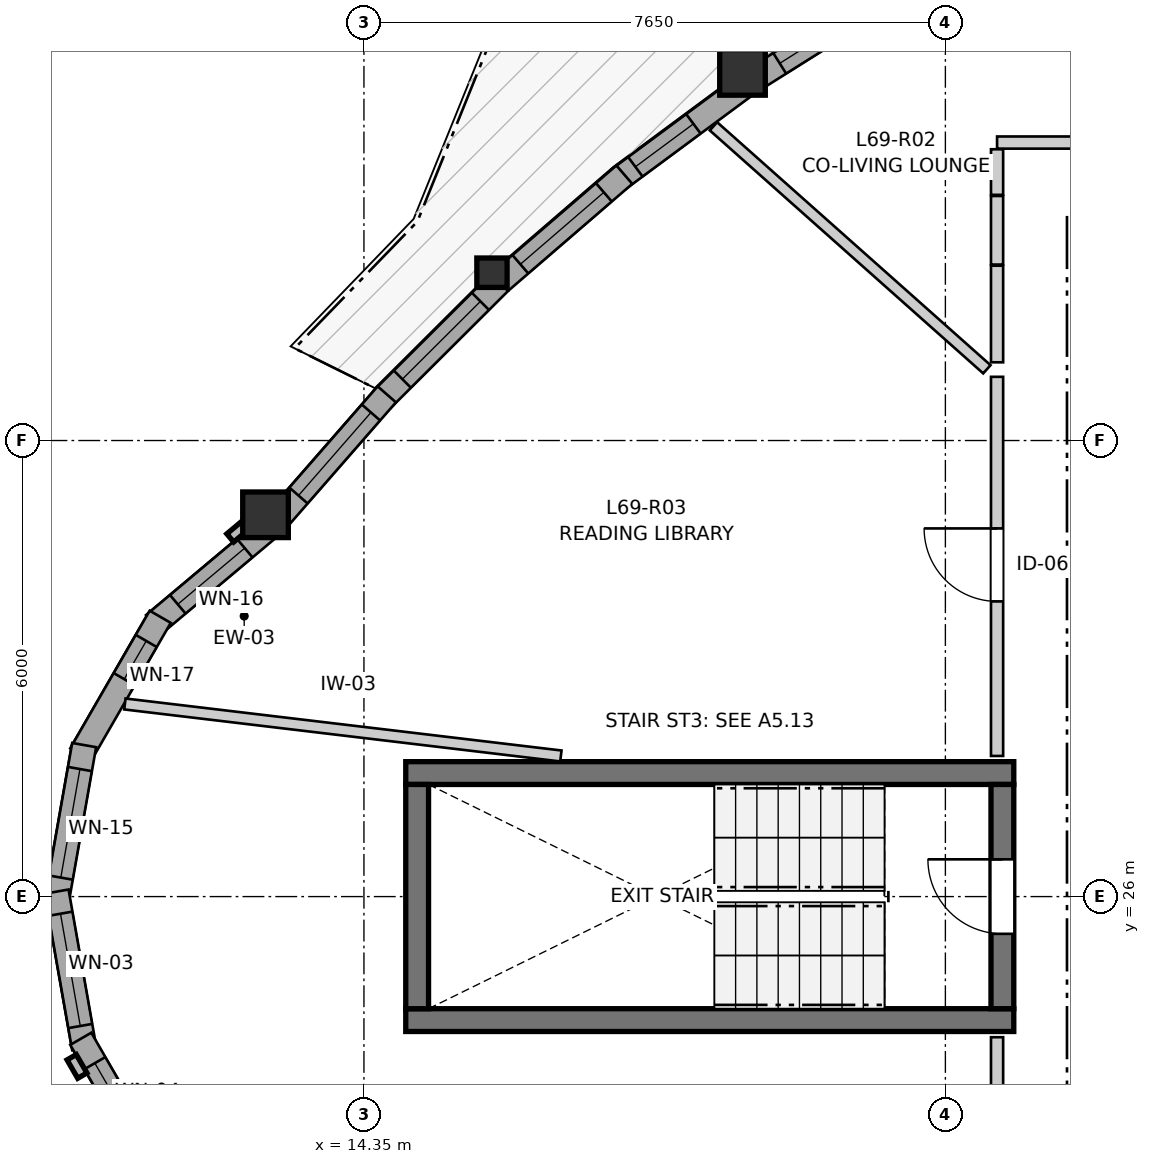
"""IFC4 building model, lengths in metres.
Left out: names, types, materials, properties, quantities, classifications, styles, units other than length and angle.
Written with IfcOpenShell. Run it as: python <this file> out.ifc"""

import sys

from ifc_helpers import new_model, si_unit, direction, frame, frame_2d, origin, origin_2d, place, context, subcontext, project, spatial, rectangle, i_section, extrude, source, transform, mapped, element, fill, save


model = new_model("IFC4")
c1 = context("Model", 3, precision=1e-05, world=origin(), true_north=direction((0.0, 1.0)))
c2 = subcontext(c1, "Body", "Model", "MODEL_VIEW")
j1 = project(units=[si_unit("LENGTHUNIT", "METRE"), si_unit("PLANEANGLEUNIT", "RADIAN")], contexts=[c1])
p1 = place(None, origin())
s1 = spatial("IfcSite", under=j1, at=p1, CompositionType="ELEMENT")
p2 = place(p1, origin())
s2 = spatial("IfcBuilding", under=s1, at=p2, CompositionType="ELEMENT")
p3 = place(p2, frame((0.0, 0.0, 230.8)))
s3 = spatial("IfcBuildingStorey", under=s2, at=p3, CompositionType="ELEMENT", Elevation=230.8)
for number, where, z_axis, x_axis in (
    (1, (14.9, 24.375, 0.0), (0.0, 0.0, 1.0), (1.0, 0.0, 0.0)),
    (2, (22.9, 27.625, 0.0), (0.0, 0.0, 1.0), (-1.0, 0.0, 0.0)),
):
    element("IfcWall", number, at=place(p3, frame(where, z_axis=z_axis, x_axis=x_axis)), inside=s3, PredefinedType="SHEAR", context=c2, shape_type="SweptSolid", body=[
        extrude(rectangle(XDim=8.0, YDim=0.3, at=frame_2d((4.0, 0.0))), origin(), (0.0, 0.0, 1.0), 2.96),
    ])
p4 = place(p3, frame((15.05, 27.475, 0.0), z_axis=(0.0, 0.0, 1.0), x_axis=(0.0, -1.0, 0.0)))
e3 = element("IfcWall", 3, at=p4, inside=s3, PredefinedType="SHEAR", context=c2, shape_type="SweptSolid", body=[
    extrude(rectangle(XDim=2.95, YDim=0.3, at=frame_2d((1.475, 0.0))), origin(), (0.0, 0.0, 1.0), 2.96),
])
p5 = place(p3, frame((22.75, 24.525, 0.0), z_axis=(0.0, 0.0, 1.0), x_axis=(0.0, 1.0, 0.0)))
e4 = element("IfcWall", 4, at=p5, inside=s3, PredefinedType="SHEAR", context=c2, shape_type="SweptSolid", body=[
    extrude(rectangle(XDim=2.95, YDim=0.3, at=frame_2d((1.475, 0.0))), origin(), (0.0, 0.0, 1.0), 2.96),
])
p6 = place(p5, frame((0.985, 0.0, 0.0)))
e5 = element("IfcOpeningElement", 5, at=p6, cuts=e4, PredefinedType="OPENING", context=c2, shape_type="SweptSolid", body=[
    extrude(rectangle(XDim=0.98, YDim=2.15, at=frame_2d((0.49, 1.075))), frame((0.0, 0.16, 0.0), z_axis=(0.0, -1.0, 0.0), x_axis=(1.0, 0.0, 0.0)), (0.0, 0.0, 1.0), 0.32),
])
m1 = source(origin(), c2, "Body", "SweptSolid", [
    extrude(rectangle(XDim=0.6, YDim=0.6, at=origin_2d()), origin(), (0.0, 0.0, 1.0), 2.96),
])
for number, where, z_axis, x_axis in (
    (6, (13.055, 31.023, 0.0), (0.0, 0.0, 1.0), (1.0, 0.0, 0.0)),
    (7, (19.331, 36.843, 0.0), (0.0, 0.0, 1.0), (1.0, 0.0, 0.0)),
):
    element("IfcColumn", number, at=place(p3, frame(where, z_axis=z_axis, x_axis=x_axis)), inside=s3, PredefinedType="COLUMN", context=c2, shape_type="MappedRepresentation", body=[
        mapped(m1, transform((0.0, 0.0, 0.0), x_axis=(1.0, 0.0, 0.0), y_axis=(0.0, 1.0, 0.0), z_axis=(0.0, 0.0, 1.0), scale=1.0)),
    ])
m2 = source(origin(), c2, "Body", "SweptSolid", [
    extrude(i_section(OverallWidth=0.398, OverallDepth=0.387, WebThickness=0.019, FlangeThickness=0.03, FilletRadius=0.015, at=origin_2d()), origin(), (0.0, 0.0, 1.0), 2.96),
])
p7 = place(p3, frame((16.034, 34.208, 0.0), z_axis=(0.0, 0.0, 1.0), x_axis=(1.0, 0.0, 0.0)))
e8 = element("IfcColumn", 8, at=p7, inside=s3, PredefinedType="PILASTER", context=c2, shape_type="MappedRepresentation", body=[
    mapped(m2, transform((0.0, 0.0, 0.0), x_axis=(1.0, 0.0, 0.0), y_axis=(0.0, 1.0, 0.0), z_axis=(0.0, 0.0, 1.0), scale=1.0)),
])
p8 = place(p3, frame((13.089, 30.843, 0.0), z_axis=(0.0, 0.0, 1.0), x_axis=(-0.76606505432, -0.642763045414, 0.0)))
e9 = element("IfcWall", 9, at=p8, inside=s3, PredefinedType="SOLIDWALL", context=c2, shape_type="SweptSolid", body=[
    extrude(rectangle(XDim=1.962, YDim=0.32, at=frame_2d((0.981, 0.0))), origin(), (0.0, 0.0, 1.0), 2.58),
])
p9 = place(p8, frame((0.401, 0.0, 0.82)))
e10 = element("IfcOpeningElement", 10, at=p9, cuts=e9, PredefinedType="OPENING", context=c2, shape_type="SweptSolid", body=[
    extrude(rectangle(XDim=1.15, YDim=1.2, at=frame_2d((0.575, 0.6))), frame((0.0, 0.17, 0.0), z_axis=(0.0, -1.0, 0.0), x_axis=(1.0, 0.0, 0.0)), (0.0, 0.0, 1.0), 0.34),
])
p10 = place(p3, frame((11.669, 29.681, 0.0), z_axis=(0.0, 0.0, 1.0), x_axis=(-0.49990781971, -0.866078617559, 0.0)))
e11 = element("IfcWall", 11, at=p10, inside=s3, PredefinedType="SOLIDWALL", context=c2, shape_type="SweptSolid", body=[
    extrude(rectangle(XDim=2.09, YDim=0.32, at=frame_2d((1.045, 0.0))), origin(), (0.0, 0.0, 1.0), 2.58),
])
p11 = place(p10, frame((0.367, 0.0, 0.82)))
e12 = element("IfcOpeningElement", 12, at=p11, cuts=e11, PredefinedType="OPENING", context=c2, shape_type="SweptSolid", body=[
    extrude(rectangle(XDim=0.58, YDim=1.35, at=frame_2d((0.29, 0.675))), frame((0.0, 0.17, 0.0), z_axis=(0.0, -1.0, 0.0), x_axis=(1.0, 0.0, 0.0)), (0.0, 0.0, 1.0), 0.34),
])
p12 = place(p3, frame((10.669, 27.993, 0.0), z_axis=(0.0, 0.0, 1.0), x_axis=(-0.173672066494, -0.984803540469, 0.0)))
e13 = element("IfcWall", 13, at=p12, inside=s3, PredefinedType="SOLIDWALL", context=c2, shape_type="SweptSolid", body=[
    extrude(rectangle(XDim=2.09, YDim=0.32, at=frame_2d((1.045, 0.0))), origin(), (0.0, 0.0, 1.0), 2.58),
])
p13 = place(p12, frame((0.32, 0.0, 0.82)))
e14 = element("IfcOpeningElement", 14, at=p13, cuts=e13, PredefinedType="OPENING", context=c2, shape_type="SweptSolid", body=[
    extrude(rectangle(XDim=1.45, YDim=1.25, at=frame_2d((0.725, 0.625))), frame((0.0, 0.17, 0.0), z_axis=(0.0, -1.0, 0.0), x_axis=(1.0, 0.0, 0.0)), (0.0, 0.0, 1.0), 0.34),
])
p14 = place(p3, frame((10.306, 26.065, 0.0), z_axis=(0.0, 0.0, 1.0), x_axis=(0.173672066494, -0.984803540469, 0.0)))
e15 = element("IfcWall", 15, at=p14, inside=s3, PredefinedType="SOLIDWALL", context=c2, shape_type="SweptSolid", body=[
    extrude(rectangle(XDim=2.09, YDim=0.32, at=frame_2d((1.045, 0.0))), origin(), (0.0, 0.0, 1.0), 2.58),
])
p15 = place(p14, frame((0.295, 0.0, 0.82)))
e16 = element("IfcOpeningElement", 16, at=p15, cuts=e15, PredefinedType="OPENING", context=c2, shape_type="SweptSolid", body=[
    extrude(rectangle(XDim=1.5, YDim=1.45, at=frame_2d((0.75, 0.725))), frame((0.0, 0.17, 0.0), z_axis=(0.0, -1.0, 0.0), x_axis=(1.0, 0.0, 0.0)), (0.0, 0.0, 1.0), 0.34),
])
p16 = place(p3, frame((10.625, 24.129, 0.0), z_axis=(0.0, 0.0, 1.0), x_axis=(0.49990781971, -0.866078617559, 0.0)))
e17 = element("IfcWall", 17, at=p16, inside=s3, PredefinedType="SOLIDWALL", context=c2, shape_type="SweptSolid", body=[
    extrude(rectangle(XDim=2.09, YDim=0.32, at=frame_2d((1.045, 0.0))), origin(), (0.0, 0.0, 1.0), 2.58),
])
p17 = place(p16, frame((0.37, 0.0, 0.82)))
e18 = element("IfcOpeningElement", 18, at=p17, cuts=e17, PredefinedType="OPENING", context=c2, shape_type="SweptSolid", body=[
    extrude(rectangle(XDim=1.35, YDim=1.45, at=frame_2d((0.675, 0.725))), frame((0.0, 0.17, 0.0), z_axis=(0.0, -1.0, 0.0), x_axis=(1.0, 0.0, 0.0)), (0.0, 0.0, 1.0), 0.34),
])
p18 = place(p3, frame((21.215, 37.84, 0.0), z_axis=(0.0, 0.0, 1.0), x_axis=(-0.846356989859, -0.532616039672, 0.0)))
e19 = element("IfcWall", 19, at=p18, inside=s3, PredefinedType="SOLIDWALL", context=c2, shape_type="SweptSolid", body=[
    extrude(rectangle(XDim=2.036, YDim=0.32, at=frame_2d((1.018, 0.0))), origin(), (0.0, 0.0, 1.0), 2.58),
])
p19 = place(p18, frame((0.398, 0.0, 0.82)))
e20 = element("IfcOpeningElement", 20, at=p19, cuts=e19, PredefinedType="OPENING", context=c2, shape_type="SweptSolid", body=[
    extrude(rectangle(XDim=1.25, YDim=1.35, at=frame_2d((0.625, 0.675))), frame((0.0, 0.17, 0.0), z_axis=(0.0, -1.0, 0.0), x_axis=(1.0, 0.0, 0.0)), (0.0, 0.0, 1.0), 0.34),
])
p20 = place(p3, frame((19.354, 36.661, 0.0), z_axis=(0.0, 0.0, 1.0), x_axis=(-0.803846460046, -0.59483684206, 0.0)))
e21 = element("IfcWall", 21, at=p20, inside=s3, PredefinedType="SOLIDWALL", context=c2, shape_type="SweptSolid", body=[
    extrude(rectangle(XDim=2.048, YDim=0.32, at=frame_2d((1.024, 0.0))), origin(), (0.0, 0.0, 1.0), 2.58),
])
p21 = place(p20, frame((0.832, 0.0, 0.82)))
e22 = element("IfcOpeningElement", 22, at=p21, cuts=e21, PredefinedType="OPENING", context=c2, shape_type="SweptSolid", body=[
    extrude(rectangle(XDim=0.95, YDim=1.35, at=frame_2d((0.475, 0.675))), frame((0.0, 0.17, 0.0), z_axis=(0.0, -1.0, 0.0), x_axis=(1.0, 0.0, 0.0)), (0.0, 0.0, 1.0), 0.34),
])
p22 = place(p3, frame((17.776, 35.498, 0.0), z_axis=(0.0, 0.0, 1.0), x_axis=(-0.757443010922, -0.652901282894, 0.0)))
e23 = element("IfcWall", 23, at=p22, inside=s3, PredefinedType="SOLIDWALL", context=c2, shape_type="SweptSolid", body=[
    extrude(rectangle(XDim=2.142, YDim=0.32, at=frame_2d((1.071, 0.0))), origin(), (0.0, 0.0, 1.0), 2.58),
])
p23 = place(p22, frame((0.356, 0.0, 0.82)))
e24 = element("IfcOpeningElement", 24, at=p23, cuts=e23, PredefinedType="OPENING", context=c2, shape_type="SweptSolid", body=[
    extrude(rectangle(XDim=1.45, YDim=1.25, at=frame_2d((0.725, 0.625))), frame((0.0, 0.17, 0.0), z_axis=(0.0, -1.0, 0.0), x_axis=(1.0, 0.0, 0.0)), (0.0, 0.0, 1.0), 0.34),
])
p24 = place(p3, frame((16.133, 34.08, 0.0), z_axis=(0.0, 0.0, 1.0), x_axis=(-0.708395431826, -0.705815777784, 0.0)))
e25 = element("IfcWall", 25, at=p24, inside=s3, PredefinedType="SOLIDWALL", context=c2, shape_type="SweptSolid", body=[
    extrude(rectangle(XDim=2.177, YDim=0.32, at=frame_2d((1.088, 0.0))), origin(), (0.0, 0.0, 1.0), 2.58),
])
p25 = place(p24, frame((0.354, 0.0, 0.82)))
e26 = element("IfcOpeningElement", 26, at=p25, cuts=e25, PredefinedType="OPENING", context=c2, shape_type="SweptSolid", body=[
    extrude(rectangle(XDim=1.45, YDim=1.25, at=frame_2d((0.725, 0.625))), frame((0.0, 0.17, 0.0), z_axis=(0.0, -1.0, 0.0), x_axis=(1.0, 0.0, 0.0)), (0.0, 0.0, 1.0), 0.34),
])
p26 = place(p3, frame((14.65, 32.607, 0.0), z_axis=(0.0, 0.0, 1.0), x_axis=(-0.657629046069, -0.753341912923, 0.0)))
e27 = element("IfcWall", 27, at=p26, inside=s3, PredefinedType="SOLIDWALL", context=c2, shape_type="SweptSolid", body=[
    extrude(rectangle(XDim=2.153, YDim=0.32, at=frame_2d((1.076, 0.0))), origin(), (0.0, 0.0, 1.0), 2.58),
])
p27 = place(p26, frame((0.316, 0.0, 0.82)))
e28 = element("IfcOpeningElement", 28, at=p27, cuts=e27, PredefinedType="OPENING", context=c2, shape_type="SweptSolid", body=[
    extrude(rectangle(XDim=1.45, YDim=1.25, at=frame_2d((0.725, 0.625))), frame((0.0, 0.17, 0.0), z_axis=(0.0, -1.0, 0.0), x_axis=(1.0, 0.0, 0.0)), (0.0, 0.0, 1.0), 0.34),
])
p28 = place(p3, frame((22.68, 17.653, 0.0), z_axis=(0.0, 0.0, 1.0), x_axis=(0.0, 1.0, 0.0)))
e29 = element("IfcWall", 29, at=p28, inside=s3, PredefinedType="PARTITIONING", context=c2, shape_type="SweptSolid", body=[
    extrude(rectangle(XDim=6.497, YDim=0.16, at=frame_2d((3.249, 0.0))), origin(), (0.0, 0.0, 1.0), 2.96),
])
p29 = place(p28, frame((2.796, 0.0, 0.0)))
e30 = element("IfcOpeningElement", 30, at=p29, cuts=e29, PredefinedType="OPENING", context=c2, shape_type="SweptSolid", body=[
    extrude(rectangle(XDim=0.96, YDim=2.1, at=frame_2d((0.48, 1.05))), frame((0.0, 0.09, 0.0), z_axis=(0.0, -1.0, 0.0), x_axis=(1.0, 0.0, 0.0)), (0.0, 0.0, 1.0), 0.18),
])
p30 = place(p3, frame((22.68, 27.85, 0.0), z_axis=(0.0, 0.0, 1.0), x_axis=(0.0, 1.0, 0.0)))
e31 = element("IfcWall", 31, at=p30, inside=s3, PredefinedType="PARTITIONING", context=c2, shape_type="SweptSolid", body=[
    extrude(rectangle(XDim=4.988, YDim=0.16, at=frame_2d((2.494, 0.0))), origin(), (0.0, 0.0, 1.0), 2.96),
])
p31 = place(p30, frame((2.033, 0.0, 0.0)))
e32 = element("IfcOpeningElement", 32, at=p31, cuts=e31, PredefinedType="OPENING", context=c2, shape_type="SweptSolid", body=[
    extrude(rectangle(XDim=0.96, YDim=2.1, at=frame_2d((0.48, 1.05))), frame((0.0, 0.09, 0.0), z_axis=(0.0, -1.0, 0.0), x_axis=(1.0, 0.0, 0.0)), (0.0, 0.0, 1.0), 0.18),
])
p32 = place(p3, frame((11.205, 28.534, 0.0), z_axis=(0.0, 0.0, 1.0), x_axis=(0.9929685345, -0.118378585449, 0.0)))
e33 = element("IfcWall", 33, at=p32, inside=s3, PredefinedType="PARTITIONING", context=c2, shape_type="SweptSolid", body=[
    extrude(rectangle(XDim=5.777, YDim=0.145, at=frame_2d((2.888, 0.0))), origin(), (0.0, 0.0, 1.0), 2.96),
])
p33 = place(p3, frame((18.949, 36.134, 0.0), z_axis=(0.0, 0.0, 1.0), x_axis=(0.747482088067, -0.664281964243, 0.0)))
e34 = element("IfcWall", 34, at=p33, inside=s3, PredefinedType="PARTITIONING", context=c2, shape_type="SweptSolid", body=[
    extrude(rectangle(XDim=4.812, YDim=0.145, at=frame_2d((2.406, 0.0))), origin(), (0.0, 0.0, 1.0), 2.96),
])
p34 = place(p3, frame((22.68, 33.029, 0.0), z_axis=(0.0, 0.0, 1.0), x_axis=(0.0, 1.0, 0.0)))
e35 = element("IfcWall", 35, at=p34, inside=s3, PredefinedType="PARTITIONING", context=c2, shape_type="SweptSolid", body=[
    extrude(rectangle(XDim=1.271, YDim=0.16, at=frame_2d((0.635, 0.0))), origin(), (0.0, 0.0, 1.0), 2.628),
])
p35 = place(p3, frame((22.68, 35.92, 0.0), z_axis=(0.0, 0.0, 1.0), x_axis=(1.0, 0.0, 0.0)))
e36 = element("IfcWall", 36, at=p35, inside=s3, PredefinedType="PARTITIONING", context=c2, shape_type="SweptSolid", body=[
    extrude(rectangle(XDim=1.332, YDim=0.16, at=frame_2d((0.666, 0.0))), origin(), (0.0, 0.0, 1.0), 2.96),
])
p36 = place(p3, frame((22.68, 34.315, 0.0), z_axis=(0.0, 0.0, 1.0), x_axis=(0.0, 1.0, 0.0)))
e37 = element("IfcWall", 37, at=p36, inside=s3, PredefinedType="PARTITIONING", context=c2, shape_type="SweptSolid", body=[
    extrude(rectangle(XDim=0.902, YDim=0.16, at=frame_2d((0.451, 0.0))), origin(), (0.0, 0.0, 1.0), 2.96),
])
p37 = place(p3, frame((22.68, 35.232, 0.0), z_axis=(0.0, 0.0, 1.0), x_axis=(0.0, 1.0, 0.0)))
e38 = element("IfcWall", 38, at=p37, inside=s3, PredefinedType="PARTITIONING", context=c2, shape_type="SweptSolid", body=[
    extrude(rectangle(XDim=0.6, YDim=0.16, at=frame_2d((0.3, 0.0))), origin(), (0.0, 0.0, 1.0), 2.96),
])
m3 = source(origin(), c2, "Body", "SweptSolid", [
    extrude(rectangle(XDim=1.15, YDim=1.2, at=frame_2d((0.575, 0.6))), frame((0.0, 0.03, 0.0), z_axis=(0.0, -1.0, 0.0), x_axis=(1.0, 0.0, 0.0)), (0.0, 0.0, 1.0), 0.06),
])
p38 = place(p9, origin())
e39 = element("IfcWindow", 39, at=p38, inside=s3, PartitioningType="SINGLE_PANEL", PredefinedType="WINDOW", context=c2, shape_type="MappedRepresentation", body=[
    mapped(m3, transform((0.0, 0.0, 0.0), x_axis=(1.0, 0.0, 0.0), y_axis=(0.0, 1.0, 0.0), z_axis=(0.0, 0.0, 1.0), scale=1.0)),
])
fill(e10, e39)
m4 = source(origin(), c2, "Body", "SweptSolid", [
    extrude(rectangle(XDim=0.58, YDim=1.35, at=frame_2d((0.29, 0.675))), frame((0.0, 0.03, 0.0), z_axis=(0.0, -1.0, 0.0), x_axis=(1.0, 0.0, 0.0)), (0.0, 0.0, 1.0), 0.06),
])
p39 = place(p11, origin())
e40 = element("IfcWindow", 40, at=p39, inside=s3, PartitioningType="SINGLE_PANEL", PredefinedType="WINDOW", context=c2, shape_type="MappedRepresentation", body=[
    mapped(m4, transform((0.0, 0.0, 0.0), x_axis=(1.0, 0.0, 0.0), y_axis=(0.0, 1.0, 0.0), z_axis=(0.0, 0.0, 1.0), scale=1.0)),
])
fill(e12, e40)
m5 = source(origin(), c2, "Body", "SweptSolid", [
    extrude(rectangle(XDim=1.45, YDim=1.25, at=frame_2d((0.725, 0.625))), frame((0.0, 0.03, 0.0), z_axis=(0.0, -1.0, 0.0), x_axis=(1.0, 0.0, 0.0)), (0.0, 0.0, 1.0), 0.06),
])
p40 = place(p13, origin())
e41 = element("IfcWindow", 41, at=p40, inside=s3, PartitioningType="SINGLE_PANEL", PredefinedType="WINDOW", context=c2, shape_type="MappedRepresentation", body=[
    mapped(m5, transform((0.0, 0.0, 0.0), x_axis=(1.0, 0.0, 0.0), y_axis=(0.0, 1.0, 0.0), z_axis=(0.0, 0.0, 1.0), scale=1.0)),
])
fill(e14, e41)
m6 = source(origin(), c2, "Body", "SweptSolid", [
    extrude(rectangle(XDim=1.5, YDim=1.45, at=frame_2d((0.75, 0.725))), frame((0.0, 0.03, 0.0), z_axis=(0.0, -1.0, 0.0), x_axis=(1.0, 0.0, 0.0)), (0.0, 0.0, 1.0), 0.06),
])
p41 = place(p15, origin())
e42 = element("IfcWindow", 42, at=p41, inside=s3, PartitioningType="SINGLE_PANEL", PredefinedType="WINDOW", context=c2, shape_type="MappedRepresentation", body=[
    mapped(m6, transform((0.0, 0.0, 0.0), x_axis=(1.0, 0.0, 0.0), y_axis=(0.0, 1.0, 0.0), z_axis=(0.0, 0.0, 1.0), scale=1.0)),
])
fill(e16, e42)
m7 = source(origin(), c2, "Body", "SweptSolid", [
    extrude(rectangle(XDim=1.35, YDim=1.45, at=frame_2d((0.675, 0.725))), frame((0.0, 0.03, 0.0), z_axis=(0.0, -1.0, 0.0), x_axis=(1.0, 0.0, 0.0)), (0.0, 0.0, 1.0), 0.06),
])
p42 = place(p17, origin())
e43 = element("IfcWindow", 43, at=p42, inside=s3, PartitioningType="SINGLE_PANEL", PredefinedType="WINDOW", context=c2, shape_type="MappedRepresentation", body=[
    mapped(m7, transform((0.0, 0.0, 0.0), x_axis=(1.0, 0.0, 0.0), y_axis=(0.0, 1.0, 0.0), z_axis=(0.0, 0.0, 1.0), scale=1.0)),
])
fill(e18, e43)
m8 = source(origin(), c2, "Body", "SweptSolid", [
    extrude(rectangle(XDim=1.25, YDim=1.35, at=frame_2d((0.625, 0.675))), frame((0.0, 0.03, 0.0), z_axis=(0.0, -1.0, 0.0), x_axis=(1.0, 0.0, 0.0)), (0.0, 0.0, 1.0), 0.06),
])
p43 = place(p19, origin())
e44 = element("IfcWindow", 44, at=p43, inside=s3, PartitioningType="SINGLE_PANEL", PredefinedType="WINDOW", context=c2, shape_type="MappedRepresentation", body=[
    mapped(m8, transform((0.0, 0.0, 0.0), x_axis=(1.0, 0.0, 0.0), y_axis=(0.0, 1.0, 0.0), z_axis=(0.0, 0.0, 1.0), scale=1.0)),
])
fill(e20, e44)
m9 = source(origin(), c2, "Body", "SweptSolid", [
    extrude(rectangle(XDim=0.95, YDim=1.35, at=frame_2d((0.475, 0.675))), frame((0.0, 0.03, 0.0), z_axis=(0.0, -1.0, 0.0), x_axis=(1.0, 0.0, 0.0)), (0.0, 0.0, 1.0), 0.06),
])
p44 = place(p21, origin())
e45 = element("IfcWindow", 45, at=p44, inside=s3, PartitioningType="SINGLE_PANEL", PredefinedType="WINDOW", context=c2, shape_type="MappedRepresentation", body=[
    mapped(m9, transform((0.0, 0.0, 0.0), x_axis=(1.0, 0.0, 0.0), y_axis=(0.0, 1.0, 0.0), z_axis=(0.0, 0.0, 1.0), scale=1.0)),
])
fill(e22, e45)
p45 = place(p23, origin())
e46 = element("IfcWindow", 46, at=p45, inside=s3, PartitioningType="SINGLE_PANEL", PredefinedType="WINDOW", context=c2, shape_type="MappedRepresentation", body=[
    mapped(m5, transform((0.0, 0.0, 0.0), x_axis=(1.0, 0.0, 0.0), y_axis=(0.0, 1.0, 0.0), z_axis=(0.0, 0.0, 1.0), scale=1.0)),
])
fill(e24, e46)
p46 = place(p25, origin())
e47 = element("IfcWindow", 47, at=p46, inside=s3, PartitioningType="SINGLE_PANEL", PredefinedType="WINDOW", context=c2, shape_type="MappedRepresentation", body=[
    mapped(m5, transform((0.0, 0.0, 0.0), x_axis=(1.0, 0.0, 0.0), y_axis=(0.0, 1.0, 0.0), z_axis=(0.0, 0.0, 1.0), scale=1.0)),
])
fill(e26, e47)
p47 = place(p27, origin())
e48 = element("IfcWindow", 48, at=p47, inside=s3, PartitioningType="SINGLE_PANEL", PredefinedType="WINDOW", context=c2, shape_type="MappedRepresentation", body=[
    mapped(m5, transform((0.0, 0.0, 0.0), x_axis=(1.0, 0.0, 0.0), y_axis=(0.0, 1.0, 0.0), z_axis=(0.0, 0.0, 1.0), scale=1.0)),
])
fill(e28, e48)
m10 = source(origin(), c2, "Body", "SweptSolid", [
    extrude(rectangle(XDim=0.98, YDim=2.15, at=frame_2d((0.49, 1.075))), frame((0.0, 0.025, 0.0), z_axis=(0.0, -1.0, 0.0), x_axis=(1.0, 0.0, 0.0)), (0.0, 0.0, 1.0), 0.05),
])
p48 = place(p6, origin())
e49 = element("IfcDoor", 49, at=p48, inside=s3, OperationType="SINGLE_SWING_RIGHT", PredefinedType="DOOR", context=c2, shape_type="MappedRepresentation", body=[
    mapped(m10, transform((0.0, 0.0, 0.0), x_axis=(1.0, 0.0, 0.0), y_axis=(0.0, 1.0, 0.0), z_axis=(0.0, 0.0, 1.0), scale=1.0)),
])
fill(e5, e49)
m11 = source(origin(), c2, "Body", "SweptSolid", [
    extrude(rectangle(XDim=0.96, YDim=2.1, at=frame_2d((0.48, 1.05))), frame((0.0, 0.025, 0.0), z_axis=(0.0, -1.0, 0.0), x_axis=(1.0, 0.0, 0.0)), (0.0, 0.0, 1.0), 0.05),
])
p49 = place(p31, origin())
e50 = element("IfcDoor", 50, at=p49, inside=s3, OperationType="SINGLE_SWING_RIGHT", PredefinedType="DOOR", context=c2, shape_type="MappedRepresentation", body=[
    mapped(m11, transform((0.0, 0.0, 0.0), x_axis=(1.0, 0.0, 0.0), y_axis=(0.0, 1.0, 0.0), z_axis=(0.0, 0.0, 1.0), scale=1.0)),
])
fill(e32, e50)
save(model, sys.argv[1])
